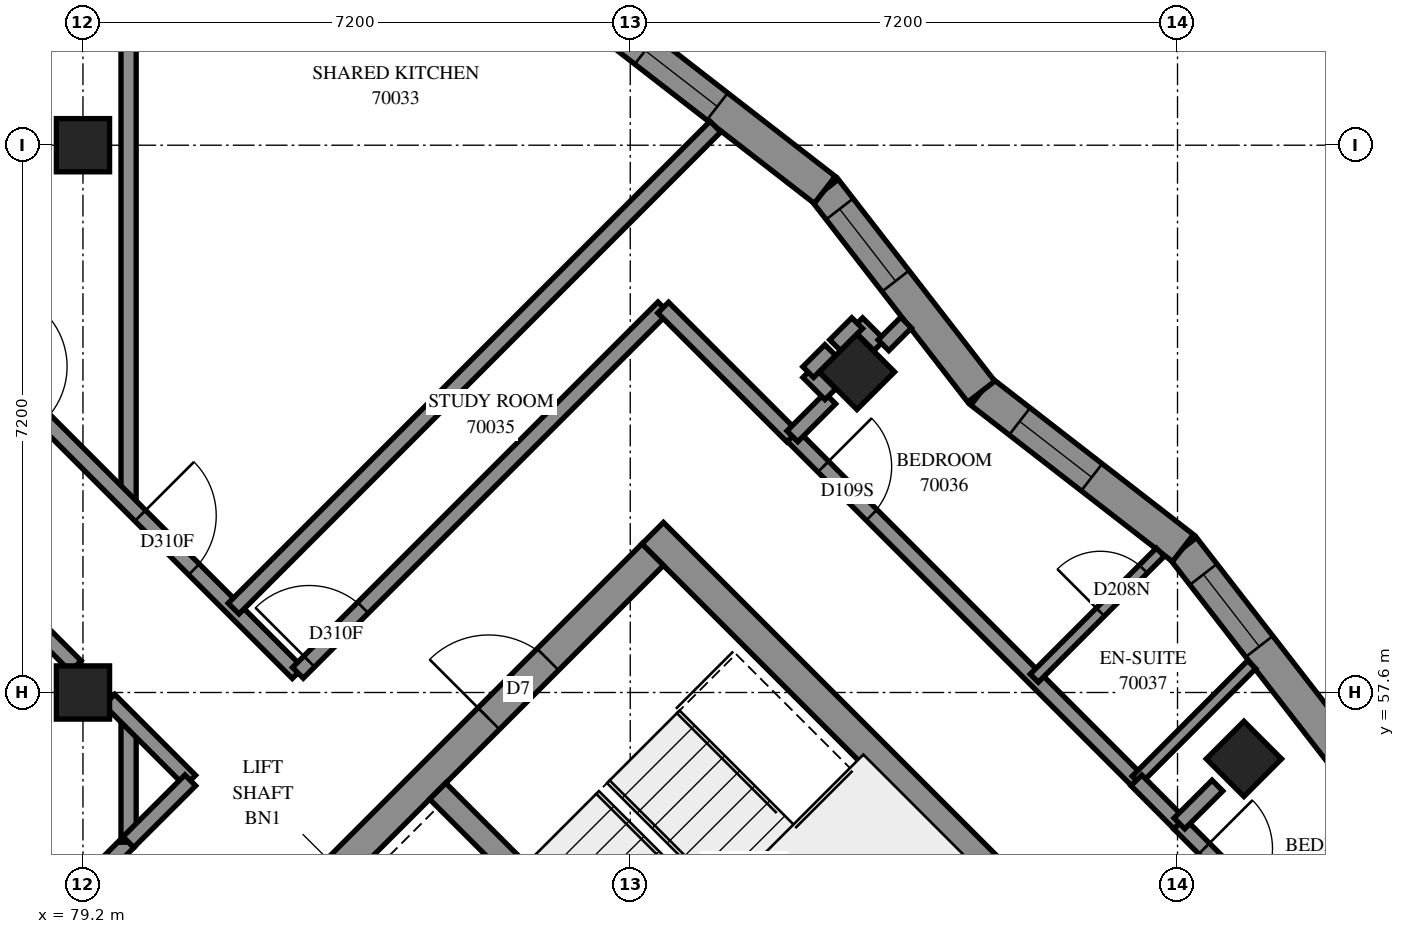
"""IFC4 building model, lengths in metres.
Left out: names, types, materials, properties, quantities, classifications, styles, units other than length and angle.
Written with IfcOpenShell. Run it as: python <this file> out.ifc"""

import sys

from ifc_helpers import new_model, si_unit, direction, frame, frame_2d, origin, origin_2d, place, context, subcontext, project, spatial, polyline, rectangle, outline, extrude, element, fill, save


model = new_model("IFC4")
c1 = context("Model", 3, precision=1e-05, world=origin(), true_north=direction((0.0, 1.0)))
c2 = subcontext(c1, "Body", "Model", "MODEL_VIEW")
j1 = project(units=[si_unit("LENGTHUNIT", "METRE"), si_unit("PLANEANGLEUNIT", "RADIAN")], contexts=[c1])
p1 = place(None, origin())
s1 = spatial("IfcSite", under=j1, at=p1, CompositionType="ELEMENT")
p2 = place(p1, origin())
s2 = spatial("IfcBuilding", under=s1, at=p2, CompositionType="ELEMENT")
p3 = place(p2, frame((0.0, 0.0, 257.4)))
s3 = spatial("IfcBuildingStorey", under=s2, at=p3, CompositionType="ELEMENT", Elevation=257.4)
for number, where, z_axis, x_axis in (
    (1, (79.2, 57.6, 0.0), (0.0, 0.0, 1.0), (1.0, 0.0, 0.0)),
    (2, (79.2, 64.8, 0.0), (0.0, 0.0, 1.0), (1.0, 0.0, 0.0)),
    (3, (89.382, 61.818, 0.0), (0.0, 0.0, 1.0), (0.707, -0.707, 0.0)),
    (4, (94.474, 56.727, 0.0), (0.0, 0.0, 1.0), (0.707, -0.707, 0.0)),
):
    element("IfcColumn", number, at=place(p3, frame(where, z_axis=z_axis, x_axis=x_axis)), inside=s3, PredefinedType="COLUMN", context=c2, shape_type="SweptSolid", body=[
        extrude(rectangle(XDim=0.7, YDim=0.7, at=origin_2d()), origin(), (0.0, 0.0, 1.0), 3.1),
    ])
p4 = place(p3, frame((86.695, 59.696, -0.3), z_axis=(0.0, 0.0, 1.0), x_axis=(0.7071100706, -0.7071034917, 0.0)))
e5 = element("IfcWall", 5, at=p4, inside=s3, PredefinedType="SHEAR", context=c2, shape_type="SweptSolid", body=[
    extrude(rectangle(XDim=15.2, YDim=0.4, at=frame_2d((7.6, 0.0))), origin(), (0.0, 0.0, 1.0), 2.7),
])
p5 = place(p4, frame((10.4, 0.0, 0.3)))
e6 = element("IfcOpeningElement", 6, at=p5, cuts=e5, PredefinedType="OPENING", context=c2, shape_type="SweptSolid", body=[
    extrude(rectangle(XDim=0.8, YDim=2.1, at=frame_2d((0.4, 1.05))), frame((0.0, 0.21, 0.0), z_axis=(0.0, -1.0, 0.0), x_axis=(1.0, 0.0, 0.0)), (0.0, 0.0, 1.0), 0.42),
])
p6 = place(p3, frame((76.513, 49.231, -0.3), z_axis=(0.0, 0.0, 1.0), x_axis=(0.7071067812, 0.7071067812, 0.0)))
e7 = element("IfcWall", 7, at=p6, inside=s3, PredefinedType="SHEAR", context=c2, shape_type="SweptSolid", body=[
    extrude(rectangle(XDim=14.4, YDim=0.4, at=frame_2d((7.2, 0.0))), origin(), (0.0, 0.0, 1.0), 2.7),
])
p7 = place(p6, frame((4.55, 0.0, 0.3)))
e8 = element("IfcOpeningElement", 8, at=p7, cuts=e7, PredefinedType="OPENING", context=c2, shape_type="SweptSolid", body=[
    extrude(rectangle(XDim=1.1, YDim=2.1, at=frame_2d((0.55, 1.05))), frame((0.0, 0.21, 0.0), z_axis=(0.0, -1.0, 0.0), x_axis=(1.0, 0.0, 0.0)), (0.0, 0.0, 1.0), 0.42),
])
p8 = place(p6, frame((11.35, 0.0, 0.3)))
e9 = element("IfcOpeningElement", 9, at=p8, cuts=e7, PredefinedType="OPENING", context=c2, shape_type="SweptSolid", body=[
    extrude(rectangle(XDim=1.1, YDim=2.1, at=frame_2d((0.55, 1.05))), frame((0.0, 0.21, 0.0), z_axis=(0.0, -1.0, 0.0), x_axis=(1.0, 0.0, 0.0)), (0.0, 0.0, 1.0), 0.42),
])
p9 = place(p3, frame((83.867, 56.302, 0.0), z_axis=(0.0, 0.0, 1.0), x_axis=(0.7071137256, -0.7070998367, 0.0)))
e10 = element("IfcWall", 10, at=p9, inside=s3, PredefinedType="SOLIDWALL", context=c2, shape_type="SweptSolid", body=[
    extrude(rectangle(XDim=7.2, YDim=0.3, at=frame_2d((3.6, 0.0))), origin(), (0.0, 0.0, 1.0), 3.1),
])
p10 = place(p3, frame((95.73, 56.846, 0.0), z_axis=(0.0, 0.0, 1.0), x_axis=(-0.612903202, 0.790158, 0.0)))
e11 = element("IfcWall", 11, at=p10, inside=s3, PredefinedType="SOLIDWALL", context=c2, shape_type="SweptSolid", body=[
    extrude(outline(polyline([(0.028, -0.225), (3.387, -0.225), (3.33, 0.225), (-0.028, 0.225), (0.028, -0.225)])), origin(), (0.0, 0.0, 1.0), 3.1),
])
p11 = place(p10, frame((1.72, 0.0, 0.45)))
e12 = element("IfcOpeningElement", 12, at=p11, cuts=e11, PredefinedType="OPENING", context=c2, shape_type="SweptSolid", body=[
    extrude(rectangle(XDim=1.2, YDim=2.55, at=frame_2d((0.6, 1.275))), frame((0.0, 0.235, 0.0), z_axis=(0.0, -1.0, 0.0), x_axis=(1.0, 0.0, 0.0)), (0.0, 0.0, 1.0), 0.47),
])
p12 = place(p3, frame((93.672, 59.5, 0.0), z_axis=(0.0, 0.0, 1.0), x_axis=(-0.790158, 0.612903202, 0.0)))
e13 = element("IfcWall", 13, at=p12, inside=s3, PredefinedType="SOLIDWALL", context=c2, shape_type="SweptSolid", body=[
    extrude(outline(polyline([(-0.028, -0.225), (3.33, -0.225), (3.387, 0.225), (0.028, 0.225), (-0.028, -0.225)])), origin(), (0.0, 0.0, 1.0), 3.1),
])
p13 = place(p12, frame((1.52, 0.0, 0.45)))
e14 = element("IfcOpeningElement", 14, at=p13, cuts=e13, PredefinedType="OPENING", context=c2, shape_type="SweptSolid", body=[
    extrude(rectangle(XDim=1.2, YDim=2.55, at=frame_2d((0.6, 1.275))), frame((0.0, 0.235, 0.0), z_axis=(0.0, -1.0, 0.0), x_axis=(1.0, 0.0, 0.0)), (0.0, 0.0, 1.0), 0.47),
])
p14 = place(p3, frame((91.018, 61.558, 0.0), z_axis=(0.0, 0.0, 1.0), x_axis=(-0.6128887822, 0.7901691849, 0.0)))
e15 = element("IfcWall", 15, at=p14, inside=s3, PredefinedType="SOLIDWALL", context=c2, shape_type="SweptSolid", body=[
    extrude(outline(polyline([(0.028, -0.225), (3.387, -0.225), (3.33, 0.225), (-0.028, 0.225), (0.028, -0.225)])), origin(), (0.0, 0.0, 1.0), 3.1),
])
p15 = place(p14, frame((1.84, 0.0, 0.45)))
e16 = element("IfcOpeningElement", 16, at=p15, cuts=e15, PredefinedType="OPENING", context=c2, shape_type="SweptSolid", body=[
    extrude(rectangle(XDim=1.2, YDim=2.55, at=frame_2d((0.6, 1.275))), frame((0.0, 0.235, 0.0), z_axis=(0.0, -1.0, 0.0), x_axis=(1.0, 0.0, 0.0)), (0.0, 0.0, 1.0), 0.47),
])
p16 = place(p3, frame((88.96, 64.212, 0.0), z_axis=(0.0, 0.0, 1.0), x_axis=(-0.7901691849, 0.6128887822, 0.0)))
e17 = element("IfcWall", 17, at=p16, inside=s3, PredefinedType="SOLIDWALL", context=c2, shape_type="SweptSolid", body=[
    extrude(outline(polyline([(-0.028, -0.225), (3.33, -0.225), (3.387, 0.225), (0.028, 0.225), (-0.028, -0.225)])), origin(), (0.0, 0.0, 1.0), 3.1),
])
p17 = place(p16, frame((1.79, 0.0, 0.45)))
e18 = element("IfcOpeningElement", 18, at=p17, cuts=e17, PredefinedType="OPENING", context=c2, shape_type="SweptSolid", body=[
    extrude(rectangle(XDim=1.2, YDim=2.55, at=frame_2d((0.6, 1.275))), frame((0.0, 0.235, 0.0), z_axis=(0.0, -1.0, 0.0), x_axis=(1.0, 0.0, 0.0)), (0.0, 0.0, 1.0), 0.47),
])
p18 = place(p3, frame((79.8, 60.086, 0.0), z_axis=(0.0, 0.0, 1.0), x_axis=(0.0, 1.0, 0.0)))
e19 = element("IfcWall", 19, at=p18, inside=s3, PredefinedType="PARTITIONING", context=c2, shape_type="SweptSolid", body=[
    extrude(rectangle(XDim=12.914, YDim=0.2, at=frame_2d((6.457, 0.0))), origin(), (0.0, 0.0, 1.0), 3.1),
])
p19 = place(p3, frame((74.397, 65.483, 0.0), z_axis=(0.0, 0.0, 1.0), x_axis=(0.7071067812, -0.7071067812, 0.0)))
e20 = element("IfcWall", 20, at=p19, inside=s3, PredefinedType="PARTITIONING", context=c2, shape_type="SweptSolid", body=[
    extrude(rectangle(XDim=10.788, YDim=0.2, at=frame_2d((5.394, 0.0))), origin(), (0.0, 0.0, 1.0), 3.1),
])
p20 = place(p19, frame((5.083, 0.0, 0.0)))
e21 = element("IfcOpeningElement", 21, at=p20, cuts=e20, PredefinedType="OPENING", context=c2, shape_type="SweptSolid", body=[
    extrude(rectangle(XDim=1.0, YDim=2.1, at=frame_2d((0.5, 1.05))), frame((0.0, 0.11, 0.0), z_axis=(0.0, -1.0, 0.0), x_axis=(1.0, 0.0, 0.0)), (0.0, 0.0, 1.0), 0.22),
])
p21 = place(p19, frame((7.858, 0.0, 0.0)))
e22 = element("IfcOpeningElement", 22, at=p21, cuts=e20, PredefinedType="OPENING", context=c2, shape_type="SweptSolid", body=[
    extrude(rectangle(XDim=1.0, YDim=2.1, at=frame_2d((0.5, 1.05))), frame((0.0, 0.11, 0.0), z_axis=(0.0, -1.0, 0.0), x_axis=(1.0, 0.0, 0.0)), (0.0, 0.0, 1.0), 0.22),
])
p22 = place(p3, frame((81.182, 58.704, 0.0), z_axis=(0.0, 0.0, 1.0), x_axis=(0.7069952238, 0.707218321, 0.0)))
e23 = element("IfcWall", 23, at=p22, inside=s3, PredefinedType="PARTITIONING", context=c2, shape_type="SweptSolid", body=[
    extrude(rectangle(XDim=8.965, YDim=0.2, at=frame_2d((4.482, 0.0))), origin(), (0.0, 0.0, 1.0), 3.1),
])
p23 = place(p3, frame((82.028, 57.858, 0.0), z_axis=(0.0, 0.0, 1.0), x_axis=(0.7071067812, 0.7071067812, 0.0)))
e24 = element("IfcWall", 24, at=p23, inside=s3, PredefinedType="PARTITIONING", context=c2, shape_type="SweptSolid", body=[
    extrude(rectangle(XDim=6.8, YDim=0.2, at=frame_2d((3.4, 0.0))), origin(), (0.0, 0.0, 1.0), 3.1),
])
p24 = place(p23, frame((0.211, 0.0, 0.0)))
e25 = element("IfcOpeningElement", 25, at=p24, cuts=e24, PredefinedType="OPENING", context=c2, shape_type="SweptSolid", body=[
    extrude(rectangle(XDim=1.0, YDim=2.1, at=frame_2d((0.5, 1.05))), frame((0.0, 0.11, 0.0), z_axis=(0.0, -1.0, 0.0), x_axis=(1.0, 0.0, 0.0)), (0.0, 0.0, 1.0), 0.22),
])
p25 = place(p3, frame((88.537, 60.973, 0.0), z_axis=(0.0, 0.0, 1.0), x_axis=(0.7071067812, -0.7071067812, 0.0)))
e26 = element("IfcWall", 26, at=p25, inside=s3, PredefinedType="PARTITIONING", context=c2, shape_type="SweptSolid", body=[
    extrude(rectangle(XDim=6.401, YDim=0.2, at=frame_2d((3.2, 0.0))), origin(), (0.0, 0.0, 1.0), 3.1),
])
p26 = place(p25, frame((0.569, 0.0, 0.0)))
e27 = element("IfcOpeningElement", 27, at=p26, cuts=e26, PredefinedType="OPENING", context=c2, shape_type="SweptSolid", body=[
    extrude(rectangle(XDim=0.9, YDim=2.1, at=frame_2d((0.45, 1.05))), frame((0.0, 0.11, 0.0), z_axis=(0.0, -1.0, 0.0), x_axis=(1.0, 0.0, 0.0)), (0.0, 0.0, 1.0), 0.22),
])
p27 = place(p3, frame((93.621, 55.875, 0.0), z_axis=(0.0, 0.0, 1.0), x_axis=(0.7071067812, -0.7071067812, 0.0)))
e28 = element("IfcWall", 28, at=p27, inside=s3, PredefinedType="PARTITIONING", context=c2, shape_type="SweptSolid", body=[
    extrude(rectangle(XDim=4.5, YDim=0.2, at=frame_2d((2.25, 0.0))), origin(), (0.0, 0.0, 1.0), 3.1),
])
p28 = place(p27, frame((0.465, 0.0, 0.0)))
e29 = element("IfcOpeningElement", 29, at=p28, cuts=e28, PredefinedType="OPENING", context=c2, shape_type="SweptSolid", body=[
    extrude(rectangle(XDim=0.9, YDim=2.1, at=frame_2d((0.45, 1.05))), frame((0.0, 0.11, 0.0), z_axis=(0.0, -1.0, 0.0), x_axis=(1.0, 0.0, 0.0)), (0.0, 0.0, 1.0), 0.22),
])
p29 = place(p3, frame((77.37, 53.2, 0.0), z_axis=(0.0, 0.0, 1.0), x_axis=(0.7071067812, 0.7071067812, 0.0)))
e30 = element("IfcWall", 30, at=p29, inside=s3, PredefinedType="PARTITIONING", context=c2, shape_type="SweptSolid", body=[
    extrude(rectangle(XDim=3.437, YDim=0.2, at=frame_2d((1.718, 0.0))), origin(), (0.0, 0.0, 1.0), 3.1),
])
p30 = place(p3, frame((86.833, 62.663, 0.0), z_axis=(0.0, 0.0, 1.0), x_axis=(0.7075233388, -0.706689978, 0.0)))
e31 = element("IfcWall", 31, at=p30, inside=s3, PredefinedType="PARTITIONING", context=c2, shape_type="SweptSolid", body=[
    extrude(rectangle(XDim=2.4, YDim=0.2, at=frame_2d((1.2, 0.0))), origin(), (0.0, 0.0, 1.0), 3.1),
])
p31 = place(p3, frame((91.716, 57.788, 0.0), z_axis=(0.0, 0.0, 1.0), x_axis=(0.7071067812, 0.7071067812, 0.0)))
e32 = element("IfcWall", 32, at=p31, inside=s3, PredefinedType="PARTITIONING", context=c2, shape_type="SweptSolid", body=[
    extrude(rectangle(XDim=2.345, YDim=0.15, at=frame_2d((1.172, 0.0))), origin(), (0.0, 0.0, 1.0), 3.1),
])
p32 = place(p31, frame((1.23, 0.0, 0.0)))
e33 = element("IfcOpeningElement", 33, at=p32, cuts=e32, PredefinedType="OPENING", context=c2, shape_type="SweptSolid", body=[
    extrude(rectangle(XDim=0.8, YDim=2.1, at=frame_2d((0.4, 1.05))), frame((0.0, 0.085, 0.0), z_axis=(0.0, -1.0, 0.0), x_axis=(1.0, 0.0, 0.0)), (0.0, 0.0, 1.0), 0.17),
])
p33 = place(p3, frame((93.057, 56.447, 0.0), z_axis=(0.0, 0.0, 1.0), x_axis=(0.7066180059, 0.7075952188, 0.0)))
e34 = element("IfcWall", 34, at=p33, inside=s3, PredefinedType="PARTITIONING", context=c2, shape_type="SweptSolid", body=[
    extrude(rectangle(XDim=2.149, YDim=0.15, at=frame_2d((1.075, 0.0))), origin(), (0.0, 0.0, 1.0), 3.1),
])
p34 = place(p3, frame((79.8, 55.63, 0.0), z_axis=(0.0, 0.0, 1.0), x_axis=(0.0, 1.0, 0.0)))
e35 = element("IfcWall", 35, at=p34, inside=s3, PredefinedType="PARTITIONING", context=c2, shape_type="SweptSolid", body=[
    extrude(rectangle(XDim=1.628, YDim=0.2, at=frame_2d((0.814, 0.0))), origin(), (0.0, 0.0, 1.0), 3.1),
])
p35 = place(p3, frame((79.547, 57.505, 0.0), z_axis=(0.0, 0.0, 1.0), x_axis=(0.7071067812, -0.7071067812, 0.0)))
e36 = element("IfcWall", 36, at=p35, inside=s3, PredefinedType="PARTITIONING", context=c2, shape_type="SweptSolid", body=[
    extrude(rectangle(XDim=1.505, YDim=0.2, at=frame_2d((0.752, 0.0))), origin(), (0.0, 0.0, 1.0), 3.1),
])
p36 = place(p3, frame((79.798, 55.632, 0.0), z_axis=(0.0, 0.0, 1.0), x_axis=(0.7079759957, 0.7062364969, 0.0)))
e37 = element("IfcWall", 37, at=p36, inside=s3, PredefinedType="PARTITIONING", context=c2, shape_type="SweptSolid", body=[
    extrude(rectangle(XDim=1.15, YDim=0.2, at=frame_2d((0.575, 0.0))), origin(), (0.0, 0.0, 1.0), 3.1),
])
p37 = place(p3, frame((93.059, 56.443, 0.0), z_axis=(0.0, 0.0, 1.0), x_axis=(0.7058541592, -0.7083571881, 0.0)))
e38 = element("IfcWall", 38, at=p37, inside=s3, PredefinedType="PARTITIONING", context=c2, shape_type="SweptSolid", body=[
    extrude(rectangle(XDim=0.799, YDim=0.2, at=frame_2d((0.4, 0.0))), origin(), (0.0, 0.0, 1.0), 3.1),
])
p38 = place(p3, frame((93.625, 55.877, 0.0), z_axis=(0.0, 0.0, 1.0), x_axis=(0.7085224061, 0.7056883165, 0.0)))
e39 = element("IfcWall", 39, at=p38, inside=s3, PredefinedType="PARTITIONING", context=c2, shape_type="SweptSolid", body=[
    extrude(rectangle(XDim=0.706, YDim=0.2, at=frame_2d((0.353, 0.0))), origin(), (0.0, 0.0, 1.0), 3.1),
])
p39 = place(p3, frame((88.534, 60.971, 0.0), z_axis=(0.0, 0.0, 1.0), x_axis=(0.7071067812, 0.7071067812, 0.0)))
e40 = element("IfcWall", 40, at=p39, inside=s3, PredefinedType="PARTITIONING", context=c2, shape_type="SweptSolid", body=[
    extrude(rectangle(XDim=0.704, YDim=0.2, at=frame_2d((0.352, 0.0))), origin(), (0.0, 0.0, 1.0), 3.1),
])
p40 = place(p3, frame((78.655, 58.397, 0.0), z_axis=(0.0, 0.0, 1.0), x_axis=(0.7071067812, -0.7071067812, 0.0)))
e41 = element("IfcWall", 41, at=p40, inside=s3, PredefinedType="PARTITIONING", context=c2, shape_type="SweptSolid", body=[
    extrude(rectangle(XDim=0.636, YDim=0.2, at=frame_2d((0.318, 0.0))), origin(), (0.0, 0.0, 1.0), 3.1),
])
for number, where, z_axis, x_axis in (
    (42, (88.743, 61.815, 0.0), (0.0, 0.0, 1.0), (0.707, -0.707, 0.0)),
    (43, (89.386, 62.458, 0.0), (0.0, 0.0, 1.0), (0.707, -0.707, 0.0)),
    (44, (88.741, 61.815, 0.0), (0.0, 0.0, 1.0), (0.707, 0.707, 0.0)),
    (45, (89.095, 62.169, 0.0), (0.0, 0.0, 1.0), (0.707, 0.707, 0.0)),
):
    element("IfcWall", number, at=place(p3, frame(where, z_axis=z_axis, x_axis=x_axis)), inside=s3, PredefinedType="PARTITIONING", context=c2, shape_type="SweptSolid", body=[
        extrude(rectangle(XDim=0.41, YDim=0.2, at=frame_2d((0.205, 0.0))), origin(), (0.0, 0.0, 1.0), 3.1),
    ])
p41 = place(p3, frame((89.731, 62.169, 0.0), z_axis=(0.0, 0.0, 1.0), x_axis=(0.7072255528, 0.7069879896, 0.0)))
e46 = element("IfcWall", 46, at=p41, inside=s3, PredefinedType="PARTITIONING", context=c2, shape_type="SweptSolid", body=[
    extrude(rectangle(XDim=0.421, YDim=0.2, at=frame_2d((0.21, 0.0))), origin(), (0.0, 0.0, 1.0), 3.1),
])
p42 = place(p11, origin())
e47 = element("IfcWindow", 47, at=p42, inside=s3, PartitioningType="SINGLE_PANEL", PredefinedType="WINDOW", context=c2, shape_type="SweptSolid", body=[
    extrude(rectangle(XDim=1.2, YDim=2.55, at=frame_2d((0.6, 1.275))), frame((0.0, 0.205, 0.0), z_axis=(0.0, -1.0, 0.0), x_axis=(1.0, 0.0, 0.0)), (0.0, 0.0, 1.0), 0.06),
])
fill(e12, e47)
p43 = place(p13, origin())
e48 = element("IfcWindow", 48, at=p43, inside=s3, PartitioningType="SINGLE_PANEL", PredefinedType="WINDOW", context=c2, shape_type="SweptSolid", body=[
    extrude(rectangle(XDim=1.2, YDim=2.55, at=frame_2d((0.6, 1.275))), frame((0.0, 0.205, 0.0), z_axis=(0.0, -1.0, 0.0), x_axis=(1.0, 0.0, 0.0)), (0.0, 0.0, 1.0), 0.06),
])
fill(e14, e48)
p44 = place(p15, origin())
e49 = element("IfcWindow", 49, at=p44, inside=s3, PartitioningType="SINGLE_PANEL", PredefinedType="WINDOW", context=c2, shape_type="SweptSolid", body=[
    extrude(rectangle(XDim=1.2, YDim=2.55, at=frame_2d((0.6, 1.275))), frame((0.0, 0.205, 0.0), z_axis=(0.0, -1.0, 0.0), x_axis=(1.0, 0.0, 0.0)), (0.0, 0.0, 1.0), 0.06),
])
fill(e16, e49)
p45 = place(p17, origin())
e50 = element("IfcWindow", 50, at=p45, inside=s3, PartitioningType="SINGLE_PANEL", PredefinedType="WINDOW", context=c2, shape_type="SweptSolid", body=[
    extrude(rectangle(XDim=1.2, YDim=2.55, at=frame_2d((0.6, 1.275))), frame((0.0, 0.205, 0.0), z_axis=(0.0, -1.0, 0.0), x_axis=(1.0, 0.0, 0.0)), (0.0, 0.0, 1.0), 0.06),
])
fill(e18, e50)
p46 = place(p8, origin())
e51 = element("IfcDoor", 51, at=p46, inside=s3, OperationType="SINGLE_SWING_LEFT", PredefinedType="DOOR", context=c2, shape_type="SweptSolid", body=[
    extrude(rectangle(XDim=1.1, YDim=2.1, at=frame_2d((0.55, 1.05))), frame((0.0, 0.025, 0.0), z_axis=(0.0, -1.0, 0.0), x_axis=(1.0, 0.0, 0.0)), (0.0, 0.0, 1.0), 0.05),
])
fill(e9, e51)
p47 = place(p21, origin())
e52 = element("IfcDoor", 52, at=p47, inside=s3, OperationType="SINGLE_SWING_LEFT", PredefinedType="DOOR", context=c2, shape_type="SweptSolid", body=[
    extrude(rectangle(XDim=1.0, YDim=2.1, at=frame_2d((0.5, 1.05))), frame((0.0, 0.025, 0.0), z_axis=(0.0, -1.0, 0.0), x_axis=(1.0, 0.0, 0.0)), (0.0, 0.0, 1.0), 0.05),
])
fill(e22, e52)
p48 = place(p24, origin())
e53 = element("IfcDoor", 53, at=p48, inside=s3, OperationType="SINGLE_SWING_RIGHT", PredefinedType="DOOR", context=c2, shape_type="SweptSolid", body=[
    extrude(rectangle(XDim=1.0, YDim=2.1, at=frame_2d((0.5, 1.05))), frame((0.0, 0.025, 0.0), z_axis=(0.0, -1.0, 0.0), x_axis=(1.0, 0.0, 0.0)), (0.0, 0.0, 1.0), 0.05),
])
fill(e25, e53)
p49 = place(p26, origin())
e54 = element("IfcDoor", 54, at=p49, inside=s3, OperationType="SINGLE_SWING_LEFT", PredefinedType="DOOR", context=c2, shape_type="SweptSolid", body=[
    extrude(rectangle(XDim=0.9, YDim=2.1, at=frame_2d((0.45, 1.05))), frame((0.0, 0.025, 0.0), z_axis=(0.0, -1.0, 0.0), x_axis=(1.0, 0.0, 0.0)), (0.0, 0.0, 1.0), 0.05),
])
fill(e27, e54)
p50 = place(p32, origin())
e55 = element("IfcDoor", 55, at=p50, inside=s3, OperationType="SINGLE_SWING_RIGHT", PredefinedType="DOOR", context=c2, shape_type="SweptSolid", body=[
    extrude(rectangle(XDim=0.8, YDim=2.1, at=frame_2d((0.4, 1.05))), frame((0.0, 0.025, 0.0), z_axis=(0.0, -1.0, 0.0), x_axis=(1.0, 0.0, 0.0)), (0.0, 0.0, 1.0), 0.05),
])
fill(e33, e55)
p51 = place(p28, origin())
e56 = element("IfcDoor", 56, at=p51, inside=s3, OperationType="SINGLE_SWING_LEFT", PredefinedType="DOOR", context=c2, shape_type="SweptSolid", body=[
    extrude(rectangle(XDim=0.9, YDim=2.1, at=frame_2d((0.45, 1.05))), frame((0.0, 0.025, 0.0), z_axis=(0.0, -1.0, 0.0), x_axis=(1.0, 0.0, 0.0)), (0.0, 0.0, 1.0), 0.05),
])
fill(e29, e56)
save(model, sys.argv[1])
